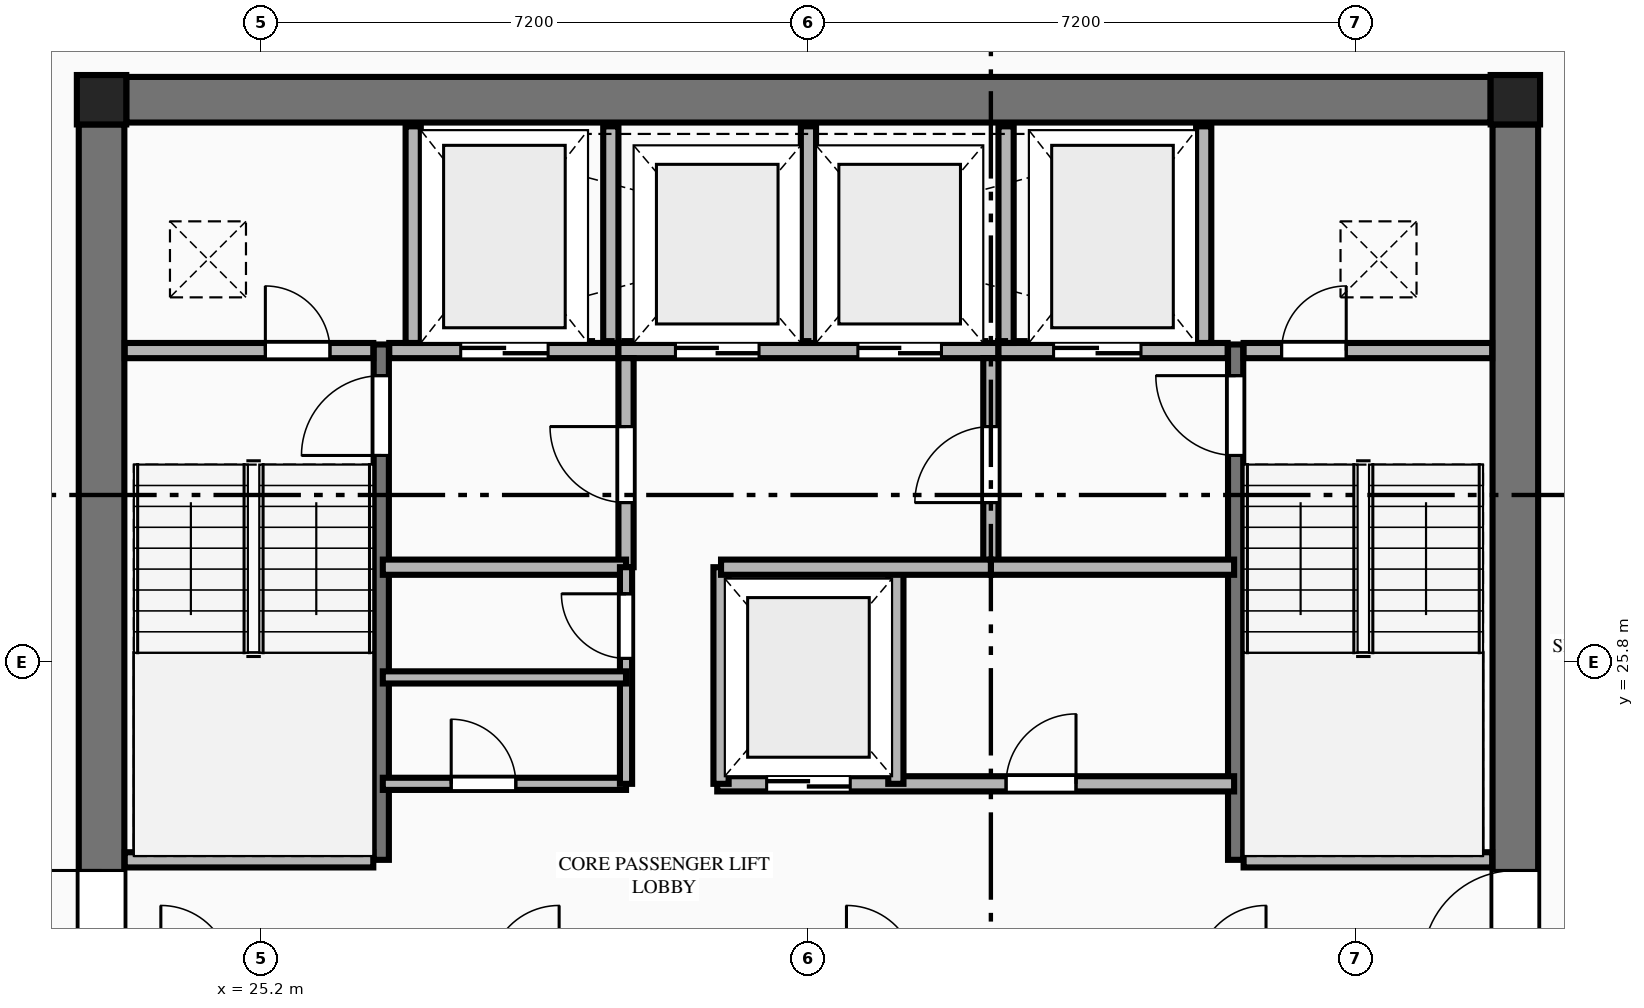
"""IFC4 building model, lengths in metres.
Left out: names, types, materials, properties, quantities, classifications, styles, units other than length and angle.
Written with IfcOpenShell. Run it as: python <this file> out.ifc"""

import sys

from ifc_helpers import new_model, si_unit, direction, frame, frame_2d, origin, origin_2d, place, context, subcontext, project, spatial, rectangle, extrude, element, fill, save


model = new_model("IFC4")
c1 = context("Model", 3, precision=1e-05, world=origin(), true_north=direction((0.0, 1.0)))
c2 = subcontext(c1, "Body", "Model", "MODEL_VIEW")
j1 = project(units=[si_unit("LENGTHUNIT", "METRE"), si_unit("PLANEANGLEUNIT", "RADIAN")], contexts=[c1])
p1 = place(None, origin())
s1 = spatial("IfcSite", under=j1, at=p1, CompositionType="ELEMENT")
p2 = place(p1, origin())
s2 = spatial("IfcBuilding", under=s1, at=p2, CompositionType="ELEMENT")
p3 = place(p2, frame((0.0, 0.0, 189.65)))
s3 = spatial("IfcBuildingStorey", under=s2, at=p3, CompositionType="ELEMENT", Elevation=189.65)
for number, where, z_axis, x_axis in (
    (1, (41.7, 33.2, 0.0), (0.0, 0.0, 1.0), (1.0, 0.0, 0.0)),
    (2, (23.1, 33.2, 0.0), (0.0, 0.0, 1.0), (1.0, 0.0, 0.0)),
):
    element("IfcColumn", number, at=place(p3, frame(where, z_axis=z_axis, x_axis=x_axis)), inside=s3, PredefinedType="COLUMN", context=c2, shape_type="SweptSolid", body=[
        extrude(rectangle(XDim=0.65, YDim=0.65, at=origin_2d()), origin(), (0.0, 0.0, 1.0), 3.55),
    ])
p4 = place(p3, frame((23.425, 33.2, 0.0), z_axis=(0.0, 0.0, 1.0), x_axis=(1.0, 0.0, 0.0)))
e3 = element("IfcWall", 3, at=p4, inside=s3, PredefinedType="SHEAR", context=c2, shape_type="SweptSolid", body=[
    extrude(rectangle(XDim=17.95, YDim=0.6, at=frame_2d((8.975, 0.0))), origin(), (0.0, 0.0, 1.0), 3.35),
])
p5 = place(p3, frame((23.1, 18.925, 0.0), z_axis=(0.0, 0.0, 1.0), x_axis=(0.0, 1.0, 0.0)))
e4 = element("IfcWall", 4, at=p5, inside=s3, PredefinedType="SHEAR", context=c2, shape_type="SweptSolid", body=[
    extrude(rectangle(XDim=13.95, YDim=0.6, at=frame_2d((6.975, 0.0))), origin(), (0.0, 0.0, 1.0), 3.35),
])
p6 = place(p5, frame((2.915, 0.0, 0.0)))
e5 = element("IfcOpeningElement", 5, at=p6, cuts=e4, PredefinedType="OPENING", context=c2, shape_type="SweptSolid", body=[
    extrude(rectangle(XDim=1.22, YDim=2.25, at=frame_2d((0.61, 1.125))), frame((0.0, 0.31, 0.0), z_axis=(0.0, -1.0, 0.0), x_axis=(1.0, 0.0, 0.0)), (0.0, 0.0, 1.0), 0.62),
])
p7 = place(p3, frame((41.7, 18.925, 0.0), z_axis=(0.0, 0.0, 1.0), x_axis=(0.0, 1.0, 0.0)))
e6 = element("IfcWall", 6, at=p7, inside=s3, PredefinedType="SHEAR", context=c2, shape_type="SweptSolid", body=[
    extrude(rectangle(XDim=13.95, YDim=0.6, at=frame_2d((6.975, 0.0))), origin(), (0.0, 0.0, 1.0), 3.35),
])
p8 = place(p7, frame((2.915, 0.0, 0.0)))
e7 = element("IfcOpeningElement", 7, at=p8, cuts=e6, PredefinedType="OPENING", context=c2, shape_type="SweptSolid", body=[
    extrude(rectangle(XDim=1.22, YDim=2.25, at=frame_2d((0.61, 1.125))), frame((0.0, 0.31, 0.0), z_axis=(0.0, -1.0, 0.0), x_axis=(1.0, 0.0, 0.0)), (0.0, 0.0, 1.0), 0.62),
])
p9 = place(p3, frame((26.78, 23.2, 0.0), z_axis=(0.0, 0.0, 1.0), x_axis=(0.0, 1.0, 0.0)))
e8 = element("IfcWall", 8, at=p9, inside=s3, PredefinedType="SHEAR", context=c2, shape_type="SweptSolid", body=[
    extrude(rectangle(XDim=6.78, YDim=0.2, at=frame_2d((3.39, 0.0))), origin(), (0.0, 0.0, 1.0), 3.55),
])
p10 = place(p9, frame((5.32, 0.0, 0.0)))
e9 = element("IfcOpeningElement", 9, at=p10, cuts=e8, PredefinedType="OPENING", context=c2, shape_type="SweptSolid", body=[
    extrude(rectangle(XDim=1.05, YDim=2.15, at=frame_2d((0.525, 1.075))), frame((0.0, 0.11, 0.0), z_axis=(0.0, -1.0, 0.0), x_axis=(1.0, 0.0, 0.0)), (0.0, 0.0, 1.0), 0.22),
])
p11 = place(p3, frame((23.405, 23.2, 0.0), z_axis=(0.0, 0.0, 1.0), x_axis=(1.0, 0.0, 0.0)))
e10 = element("IfcWall", 10, at=p11, inside=s3, PredefinedType="PLUMBINGWALL", context=c2, shape_type="SweptSolid", body=[
    extrude(rectangle(XDim=3.27, YDim=0.2, at=frame_2d((1.635, 0.0))), origin(), (0.0, 0.0, 1.0), 3.35),
])
p12 = place(p3, frame((38.02, 23.2, 0.0), z_axis=(0.0, 0.0, 1.0), x_axis=(0.0, 1.0, 0.0)))
e11 = element("IfcWall", 11, at=p12, inside=s3, PredefinedType="SHEAR", context=c2, shape_type="SweptSolid", body=[
    extrude(rectangle(XDim=6.78, YDim=0.2, at=frame_2d((3.39, 0.0))), origin(), (0.0, 0.0, 1.0), 3.55),
])
p13 = place(p12, frame((5.32, 0.0, 0.0)))
e12 = element("IfcOpeningElement", 12, at=p13, cuts=e11, PredefinedType="OPENING", context=c2, shape_type="SweptSolid", body=[
    extrude(rectangle(XDim=1.05, YDim=2.15, at=frame_2d((0.525, 1.075))), frame((0.0, 0.11, 0.0), z_axis=(0.0, -1.0, 0.0), x_axis=(1.0, 0.0, 0.0)), (0.0, 0.0, 1.0), 0.22),
])
p14 = place(p3, frame((38.125, 23.2, 0.0), z_axis=(0.0, 0.0, 1.0), x_axis=(1.0, 0.0, 0.0)))
e13 = element("IfcWall", 13, at=p14, inside=s3, PredefinedType="PLUMBINGWALL", context=c2, shape_type="SweptSolid", body=[
    extrude(rectangle(XDim=3.27, YDim=0.2, at=frame_2d((1.635, 0.0))), origin(), (0.0, 0.0, 1.0), 3.35),
])
p15 = place(p3, frame((23.405, 29.9, 0.0), z_axis=(0.0, 0.0, 1.0), x_axis=(1.0, 0.0, 0.0)))
e14 = element("IfcWall", 14, at=p15, inside=s3, PredefinedType="PLUMBINGWALL", context=c2, shape_type="SweptSolid", body=[
    extrude(rectangle(XDim=3.27, YDim=0.2, at=frame_2d((1.635, 0.0))), origin(), (0.0, 0.0, 1.0), 3.35),
])
p16 = place(p15, frame((1.85, 0.0, 0.0)))
e15 = element("IfcOpeningElement", 15, at=p16, cuts=e14, PredefinedType="OPENING", context=c2, shape_type="SweptSolid", body=[
    extrude(rectangle(XDim=0.85, YDim=2.05, at=frame_2d((0.425, 1.025))), frame((0.0, 0.11, 0.0), z_axis=(0.0, -1.0, 0.0), x_axis=(1.0, 0.0, 0.0)), (0.0, 0.0, 1.0), 0.22),
])
p17 = place(p3, frame((26.885, 29.9, 0.0), z_axis=(0.0, 0.0, 1.0), x_axis=(1.0, 0.0, 0.0)))
e16 = element("IfcWall", 16, at=p17, inside=s3, PredefinedType="PLUMBINGWALL", context=c2, shape_type="SweptSolid", body=[
    extrude(rectangle(XDim=3.015, YDim=0.2, at=frame_2d((1.507, 0.0))), origin(), (0.0, 0.0, 1.0), 3.35),
])
p18 = place(p17, frame((0.94, 0.0, 0.0)))
e17 = element("IfcOpeningElement", 17, at=p18, cuts=e16, PredefinedType="OPENING", context=c2, shape_type="SweptSolid", body=[
    extrude(rectangle(XDim=1.15, YDim=2.2, at=frame_2d((0.575, 1.1))), frame((0.0, 0.11, 0.0), z_axis=(0.0, -1.0, 0.0), x_axis=(1.0, 0.0, 0.0)), (0.0, 0.0, 1.0), 0.22),
])
p19 = place(p3, frame((29.9, 29.9, 0.0), z_axis=(0.0, 0.0, 1.0), x_axis=(1.0, 0.0, 0.0)))
e18 = element("IfcWall", 18, at=p19, inside=s3, PredefinedType="PLUMBINGWALL", context=c2, shape_type="SweptSolid", body=[
    extrude(rectangle(XDim=5.0, YDim=0.2, at=frame_2d((2.5, 0.0))), origin(), (0.0, 0.0, 1.0), 3.35),
])
p20 = place(p19, frame((0.75, 0.0, 0.0)))
e19 = element("IfcOpeningElement", 19, at=p20, cuts=e18, PredefinedType="OPENING", context=c2, shape_type="SweptSolid", body=[
    extrude(rectangle(XDim=1.1, YDim=2.2, at=frame_2d((0.55, 1.1))), frame((0.0, 0.11, 0.0), z_axis=(0.0, -1.0, 0.0), x_axis=(1.0, 0.0, 0.0)), (0.0, 0.0, 1.0), 0.22),
])
p21 = place(p19, frame((3.15, 0.0, 0.0)))
e20 = element("IfcOpeningElement", 20, at=p21, cuts=e18, PredefinedType="OPENING", context=c2, shape_type="SweptSolid", body=[
    extrude(rectangle(XDim=1.1, YDim=2.2, at=frame_2d((0.55, 1.1))), frame((0.0, 0.11, 0.0), z_axis=(0.0, -1.0, 0.0), x_axis=(1.0, 0.0, 0.0)), (0.0, 0.0, 1.0), 0.22),
])
p22 = place(p3, frame((34.9, 29.9, 0.0), z_axis=(0.0, 0.0, 1.0), x_axis=(1.0, 0.0, 0.0)))
e21 = element("IfcWall", 21, at=p22, inside=s3, PredefinedType="PLUMBINGWALL", context=c2, shape_type="SweptSolid", body=[
    extrude(rectangle(XDim=3.015, YDim=0.2, at=frame_2d((1.508, 0.0))), origin(), (0.0, 0.0, 1.0), 3.35),
])
p23 = place(p22, frame((0.725, 0.0, 0.0)))
e22 = element("IfcOpeningElement", 22, at=p23, cuts=e21, PredefinedType="OPENING", context=c2, shape_type="SweptSolid", body=[
    extrude(rectangle(XDim=1.15, YDim=2.2, at=frame_2d((0.575, 1.1))), frame((0.0, 0.11, 0.0), z_axis=(0.0, -1.0, 0.0), x_axis=(1.0, 0.0, 0.0)), (0.0, 0.0, 1.0), 0.22),
])
p24 = place(p3, frame((38.125, 29.9, 0.0), z_axis=(0.0, 0.0, 1.0), x_axis=(1.0, 0.0, 0.0)))
e23 = element("IfcWall", 23, at=p24, inside=s3, PredefinedType="PLUMBINGWALL", context=c2, shape_type="SweptSolid", body=[
    extrude(rectangle(XDim=3.27, YDim=0.2, at=frame_2d((1.635, 0.0))), origin(), (0.0, 0.0, 1.0), 3.35),
])
p25 = place(p24, frame((0.5, 0.0, 0.0)))
e24 = element("IfcOpeningElement", 24, at=p25, cuts=e23, PredefinedType="OPENING", context=c2, shape_type="SweptSolid", body=[
    extrude(rectangle(XDim=0.85, YDim=2.05, at=frame_2d((0.425, 1.025))), frame((0.0, 0.11, 0.0), z_axis=(0.0, -1.0, 0.0), x_axis=(1.0, 0.0, 0.0)), (0.0, 0.0, 1.0), 0.22),
])
for number, where, z_axis, x_axis in (
    (25, (27.2, 30.0, 0.0), (0.0, 0.0, 1.0), (0.0, 1.0, 0.0)),
    (26, (29.8, 30.0, 0.0), (0.0, 0.0, 1.0), (0.0, 1.0, 0.0)),
    (27, (32.4, 30.0, 0.0), (0.0, 0.0, 1.0), (0.0, 1.0, 0.0)),
    (28, (35.0, 30.0, 0.0), (0.0, 0.0, 1.0), (0.0, 1.0, 0.0)),
    (29, (37.6, 30.0, 0.0), (0.0, 0.0, 1.0), (0.0, 1.0, 0.0)),
):
    element("IfcWall", number, at=place(p3, frame(where, z_axis=z_axis, x_axis=x_axis)), inside=s3, PredefinedType="PLUMBINGWALL", context=c2, shape_type="SweptSolid", body=[
        extrude(rectangle(XDim=2.85, YDim=0.2, at=frame_2d((1.425, 0.0))), origin(), (0.0, 0.0, 1.0), 3.35),
    ])
p26 = place(p3, frame((30.0, 27.05, 0.0), z_axis=(0.0, 0.0, 1.0), x_axis=(0.0, 1.0, 0.0)))
e30 = element("IfcWall", 30, at=p26, inside=s3, PredefinedType="PLUMBINGWALL", context=c2, shape_type="SweptSolid", body=[
    extrude(rectangle(XDim=2.75, YDim=0.2, at=frame_2d((1.375, 0.0))), origin(), (0.0, 0.0, 1.0), 3.35),
])
p27 = place(p26, frame((0.85, 0.0, 0.0)))
e31 = element("IfcOpeningElement", 31, at=p27, cuts=e30, PredefinedType="OPENING", context=c2, shape_type="SweptSolid", body=[
    extrude(rectangle(XDim=1.0, YDim=2.15, at=frame_2d((0.5, 1.075))), frame((0.0, 0.11, 0.0), z_axis=(0.0, -1.0, 0.0), x_axis=(1.0, 0.0, 0.0)), (0.0, 0.0, 1.0), 0.22),
])
p28 = place(p3, frame((26.8, 27.05, 0.0), z_axis=(0.0, 0.0, 1.0), x_axis=(1.0, 0.0, 0.0)))
e32 = element("IfcWall", 32, at=p28, inside=s3, PredefinedType="PLUMBINGWALL", context=c2, shape_type="SweptSolid", body=[
    extrude(rectangle(XDim=3.2, YDim=0.2, at=frame_2d((1.6, 0.0))), origin(), (0.0, 0.0, 1.0), 3.35),
])
p29 = place(p3, frame((34.8, 27.05, 0.0), z_axis=(0.0, 0.0, 1.0), x_axis=(0.0, 1.0, 0.0)))
e33 = element("IfcWall", 33, at=p29, inside=s3, PredefinedType="PLUMBINGWALL", context=c2, shape_type="SweptSolid", body=[
    extrude(rectangle(XDim=2.75, YDim=0.2, at=frame_2d((1.375, 0.0))), origin(), (0.0, 0.0, 1.0), 3.35),
])
p30 = place(p29, frame((0.85, 0.0, 0.0)))
e34 = element("IfcOpeningElement", 34, at=p30, cuts=e33, PredefinedType="OPENING", context=c2, shape_type="SweptSolid", body=[
    extrude(rectangle(XDim=1.0, YDim=2.15, at=frame_2d((0.5, 1.075))), frame((0.0, 0.11, 0.0), z_axis=(0.0, -1.0, 0.0), x_axis=(1.0, 0.0, 0.0)), (0.0, 0.0, 1.0), 0.22),
])
p31 = place(p3, frame((34.8, 27.05, 0.0), z_axis=(0.0, 0.0, 1.0), x_axis=(1.0, 0.0, 0.0)))
e35 = element("IfcWall", 35, at=p31, inside=s3, PredefinedType="PLUMBINGWALL", context=c2, shape_type="SweptSolid", body=[
    extrude(rectangle(XDim=3.2, YDim=0.2, at=frame_2d((1.6, 0.0))), origin(), (0.0, 0.0, 1.0), 3.35),
])
p32 = place(p3, frame((26.8, 24.2, 0.0), z_axis=(0.0, 0.0, 1.0), x_axis=(1.0, 0.0, 0.0)))
e36 = element("IfcWall", 36, at=p32, inside=s3, PredefinedType="PARTITIONING", context=c2, shape_type="SweptSolid", body=[
    extrude(rectangle(XDim=3.2, YDim=0.16, at=frame_2d((1.6, 0.0))), origin(), (0.0, 0.0, 1.0), 3.35),
])
p33 = place(p32, frame((0.9, 0.0, 0.0)))
e37 = element("IfcOpeningElement", 37, at=p33, cuts=e36, PredefinedType="OPENING", context=c2, shape_type="SweptSolid", body=[
    extrude(rectangle(XDim=0.85, YDim=2.05, at=frame_2d((0.425, 1.025))), frame((0.0, 0.09, 0.0), z_axis=(0.0, -1.0, 0.0), x_axis=(1.0, 0.0, 0.0)), (0.0, 0.0, 1.0), 0.18),
])
p34 = place(p3, frame((30.0, 24.2, 0.0), z_axis=(0.0, 0.0, 1.0), x_axis=(0.0, 1.0, 0.0)))
e38 = element("IfcWall", 38, at=p34, inside=s3, PredefinedType="PARTITIONING", context=c2, shape_type="SweptSolid", body=[
    extrude(rectangle(XDim=2.85, YDim=0.16, at=frame_2d((1.425, 0.0))), origin(), (0.0, 0.0, 1.0), 3.35),
])
p35 = place(p34, frame((1.65, 0.0, 0.0)))
e39 = element("IfcOpeningElement", 39, at=p35, cuts=e38, PredefinedType="OPENING", context=c2, shape_type="SweptSolid", body=[
    extrude(rectangle(XDim=0.85, YDim=2.05, at=frame_2d((0.425, 1.025))), frame((0.0, 0.09, 0.0), z_axis=(0.0, -1.0, 0.0), x_axis=(1.0, 0.0, 0.0)), (0.0, 0.0, 1.0), 0.18),
])
p36 = place(p3, frame((31.2, 24.2, 0.0), z_axis=(0.0, 0.0, 1.0), x_axis=(1.0, 0.0, 0.0)))
e40 = element("IfcWall", 40, at=p36, inside=s3, PredefinedType="PLUMBINGWALL", context=c2, shape_type="SweptSolid", body=[
    extrude(rectangle(XDim=6.8, YDim=0.2, at=frame_2d((3.4, 0.0))), origin(), (0.0, 0.0, 1.0), 3.35),
])
p37 = place(p36, frame((0.65, 0.0, 0.0)))
e41 = element("IfcOpeningElement", 41, at=p37, cuts=e40, PredefinedType="OPENING", context=c2, shape_type="SweptSolid", body=[
    extrude(rectangle(XDim=1.1, YDim=2.2, at=frame_2d((0.55, 1.1))), frame((0.0, 0.11, 0.0), z_axis=(0.0, -1.0, 0.0), x_axis=(1.0, 0.0, 0.0)), (0.0, 0.0, 1.0), 0.22),
])
p38 = place(p36, frame((3.8, 0.0, 0.0)))
e42 = element("IfcOpeningElement", 42, at=p38, cuts=e40, PredefinedType="OPENING", context=c2, shape_type="SweptSolid", body=[
    extrude(rectangle(XDim=0.92, YDim=2.15, at=frame_2d((0.46, 1.075))), frame((0.0, 0.11, 0.0), z_axis=(0.0, -1.0, 0.0), x_axis=(1.0, 0.0, 0.0)), (0.0, 0.0, 1.0), 0.22),
])
for number, where, z_axis, x_axis in (
    (43, (31.25, 24.2, 0.0), (0.0, 0.0, 1.0), (0.0, 1.0, 0.0)),
    (44, (33.55, 24.2, 0.0), (0.0, 0.0, 1.0), (0.0, 1.0, 0.0)),
):
    element("IfcWall", number, at=place(p3, frame(where, z_axis=z_axis, x_axis=x_axis)), inside=s3, PredefinedType="PLUMBINGWALL", context=c2, shape_type="SweptSolid", body=[
        extrude(rectangle(XDim=2.85, YDim=0.2, at=frame_2d((1.425, 0.0))), origin(), (0.0, 0.0, 1.0), 3.35),
    ])
p39 = place(p3, frame((31.25, 27.05, 0.0), z_axis=(0.0, 0.0, 1.0), x_axis=(1.0, 0.0, 0.0)))
e45 = element("IfcWall", 45, at=p39, inside=s3, PredefinedType="PLUMBINGWALL", context=c2, shape_type="SweptSolid", body=[
    extrude(rectangle(XDim=3.55, YDim=0.2, at=frame_2d((1.775, 0.0))), origin(), (0.0, 0.0, 1.0), 3.35),
])
p40 = place(p3, frame((26.8, 25.6, 0.0), z_axis=(0.0, 0.0, 1.0), x_axis=(1.0, 0.0, 0.0)))
e46 = element("IfcWall", 46, at=p40, inside=s3, PredefinedType="PARTITIONING", context=c2, shape_type="SweptSolid", body=[
    extrude(rectangle(XDim=3.2, YDim=0.16, at=frame_2d((1.6, 0.0))), origin(), (0.0, 0.0, 1.0), 3.35),
])
p41 = place(p6, origin())
e47 = element("IfcDoor", 47, at=p41, inside=s3, OperationType="SINGLE_SWING_RIGHT", PredefinedType="DOOR", context=c2, shape_type="SweptSolid", body=[
    extrude(rectangle(XDim=1.22, YDim=2.25, at=frame_2d((0.61, 1.125))), frame((0.0, 0.025, 0.0), z_axis=(0.0, -1.0, 0.0), x_axis=(1.0, 0.0, 0.0)), (0.0, 0.0, 1.0), 0.05),
])
fill(e5, e47)
p42 = place(p8, origin())
e48 = element("IfcDoor", 48, at=p42, inside=s3, OperationType="SINGLE_SWING_LEFT", PredefinedType="DOOR", context=c2, shape_type="SweptSolid", body=[
    extrude(rectangle(XDim=1.22, YDim=2.25, at=frame_2d((0.61, 1.125))), frame((0.0, 0.025, 0.0), z_axis=(0.0, -1.0, 0.0), x_axis=(1.0, 0.0, 0.0)), (0.0, 0.0, 1.0), 0.05),
])
fill(e7, e48)
p43 = place(p10, origin())
e49 = element("IfcDoor", 49, at=p43, inside=s3, OperationType="SINGLE_SWING_LEFT", PredefinedType="DOOR", context=c2, shape_type="SweptSolid", body=[
    extrude(rectangle(XDim=1.05, YDim=2.15, at=frame_2d((0.525, 1.075))), frame((0.0, 0.025, 0.0), z_axis=(0.0, -1.0, 0.0), x_axis=(1.0, 0.0, 0.0)), (0.0, 0.0, 1.0), 0.05),
])
fill(e9, e49)
p44 = place(p13, origin())
e50 = element("IfcDoor", 50, at=p44, inside=s3, OperationType="SINGLE_SWING_RIGHT", PredefinedType="DOOR", context=c2, shape_type="SweptSolid", body=[
    extrude(rectangle(XDim=1.05, YDim=2.15, at=frame_2d((0.525, 1.075))), frame((0.0, 0.025, 0.0), z_axis=(0.0, -1.0, 0.0), x_axis=(1.0, 0.0, 0.0)), (0.0, 0.0, 1.0), 0.05),
])
fill(e12, e50)
p45 = place(p16, origin())
e51 = element("IfcDoor", 51, at=p45, inside=s3, OperationType="SINGLE_SWING_LEFT", PredefinedType="DOOR", context=c2, shape_type="SweptSolid", body=[
    extrude(rectangle(XDim=0.85, YDim=2.05, at=frame_2d((0.425, 1.025))), frame((0.0, 0.025, 0.0), z_axis=(0.0, -1.0, 0.0), x_axis=(1.0, 0.0, 0.0)), (0.0, 0.0, 1.0), 0.05),
])
fill(e15, e51)
p46 = place(p25, origin())
e52 = element("IfcDoor", 52, at=p46, inside=s3, OperationType="SINGLE_SWING_RIGHT", PredefinedType="DOOR", context=c2, shape_type="SweptSolid", body=[
    extrude(rectangle(XDim=0.85, YDim=2.05, at=frame_2d((0.425, 1.025))), frame((0.0, 0.025, 0.0), z_axis=(0.0, -1.0, 0.0), x_axis=(1.0, 0.0, 0.0)), (0.0, 0.0, 1.0), 0.05),
])
fill(e24, e52)
p47 = place(p18, origin())
e53 = element("IfcDoor", 53, at=p47, inside=s3, OperationType="DOUBLE_DOOR_SLIDING", PredefinedType="DOOR", context=c2, shape_type="SweptSolid", body=[
    extrude(rectangle(XDim=1.15, YDim=2.2, at=frame_2d((0.575, 1.1))), frame((0.0, 0.025, 0.0), z_axis=(0.0, -1.0, 0.0), x_axis=(1.0, 0.0, 0.0)), (0.0, 0.0, 1.0), 0.05),
])
fill(e17, e53)
p48 = place(p23, origin())
e54 = element("IfcDoor", 54, at=p48, inside=s3, OperationType="DOUBLE_DOOR_SLIDING", PredefinedType="DOOR", context=c2, shape_type="SweptSolid", body=[
    extrude(rectangle(XDim=1.15, YDim=2.2, at=frame_2d((0.575, 1.1))), frame((0.0, 0.025, 0.0), z_axis=(0.0, -1.0, 0.0), x_axis=(1.0, 0.0, 0.0)), (0.0, 0.0, 1.0), 0.05),
])
fill(e22, e54)
p49 = place(p20, origin())
e55 = element("IfcDoor", 55, at=p49, inside=s3, OperationType="DOUBLE_DOOR_SLIDING", PredefinedType="DOOR", context=c2, shape_type="SweptSolid", body=[
    extrude(rectangle(XDim=1.1, YDim=2.2, at=frame_2d((0.55, 1.1))), frame((0.0, 0.025, 0.0), z_axis=(0.0, -1.0, 0.0), x_axis=(1.0, 0.0, 0.0)), (0.0, 0.0, 1.0), 0.05),
])
fill(e19, e55)
p50 = place(p21, origin())
e56 = element("IfcDoor", 56, at=p50, inside=s3, OperationType="DOUBLE_DOOR_SLIDING", PredefinedType="DOOR", context=c2, shape_type="SweptSolid", body=[
    extrude(rectangle(XDim=1.1, YDim=2.2, at=frame_2d((0.55, 1.1))), frame((0.0, 0.025, 0.0), z_axis=(0.0, -1.0, 0.0), x_axis=(1.0, 0.0, 0.0)), (0.0, 0.0, 1.0), 0.05),
])
fill(e20, e56)
p51 = place(p27, origin())
e57 = element("IfcDoor", 57, at=p51, inside=s3, OperationType="SINGLE_SWING_RIGHT", PredefinedType="DOOR", context=c2, shape_type="SweptSolid", body=[
    extrude(rectangle(XDim=1.0, YDim=2.15, at=frame_2d((0.5, 1.075))), frame((0.0, 0.025, 0.0), z_axis=(0.0, -1.0, 0.0), x_axis=(1.0, 0.0, 0.0)), (0.0, 0.0, 1.0), 0.05),
])
fill(e31, e57)
p52 = place(p30, origin())
e58 = element("IfcDoor", 58, at=p52, inside=s3, OperationType="SINGLE_SWING_LEFT", PredefinedType="DOOR", context=c2, shape_type="SweptSolid", body=[
    extrude(rectangle(XDim=1.0, YDim=2.15, at=frame_2d((0.5, 1.075))), frame((0.0, 0.025, 0.0), z_axis=(0.0, -1.0, 0.0), x_axis=(1.0, 0.0, 0.0)), (0.0, 0.0, 1.0), 0.05),
])
fill(e34, e58)
p53 = place(p37, origin())
e59 = element("IfcDoor", 59, at=p53, inside=s3, OperationType="DOUBLE_DOOR_SLIDING", PredefinedType="DOOR", context=c2, shape_type="SweptSolid", body=[
    extrude(rectangle(XDim=1.1, YDim=2.2, at=frame_2d((0.55, 1.1))), frame((0.0, 0.025, 0.0), z_axis=(0.0, -1.0, 0.0), x_axis=(1.0, 0.0, 0.0)), (0.0, 0.0, 1.0), 0.05),
])
fill(e41, e59)
p54 = place(p33, origin())
e60 = element("IfcDoor", 60, at=p54, inside=s3, OperationType="SINGLE_SWING_LEFT", PredefinedType="DOOR", context=c2, shape_type="SweptSolid", body=[
    extrude(rectangle(XDim=0.85, YDim=2.05, at=frame_2d((0.425, 1.025))), frame((0.0, 0.025, 0.0), z_axis=(0.0, -1.0, 0.0), x_axis=(1.0, 0.0, 0.0)), (0.0, 0.0, 1.0), 0.05),
])
fill(e37, e60)
p55 = place(p35, origin())
e61 = element("IfcDoor", 61, at=p55, inside=s3, OperationType="SINGLE_SWING_RIGHT", PredefinedType="DOOR", context=c2, shape_type="SweptSolid", body=[
    extrude(rectangle(XDim=0.85, YDim=2.05, at=frame_2d((0.425, 1.025))), frame((0.0, 0.025, 0.0), z_axis=(0.0, -1.0, 0.0), x_axis=(1.0, 0.0, 0.0)), (0.0, 0.0, 1.0), 0.05),
])
fill(e39, e61)
p56 = place(p38, origin())
e62 = element("IfcDoor", 62, at=p56, inside=s3, OperationType="SINGLE_SWING_RIGHT", PredefinedType="DOOR", context=c2, shape_type="SweptSolid", body=[
    extrude(rectangle(XDim=0.92, YDim=2.15, at=frame_2d((0.46, 1.075))), frame((0.0, 0.025, 0.0), z_axis=(0.0, -1.0, 0.0), x_axis=(1.0, 0.0, 0.0)), (0.0, 0.0, 1.0), 0.05),
])
fill(e42, e62)
save(model, sys.argv[1])
